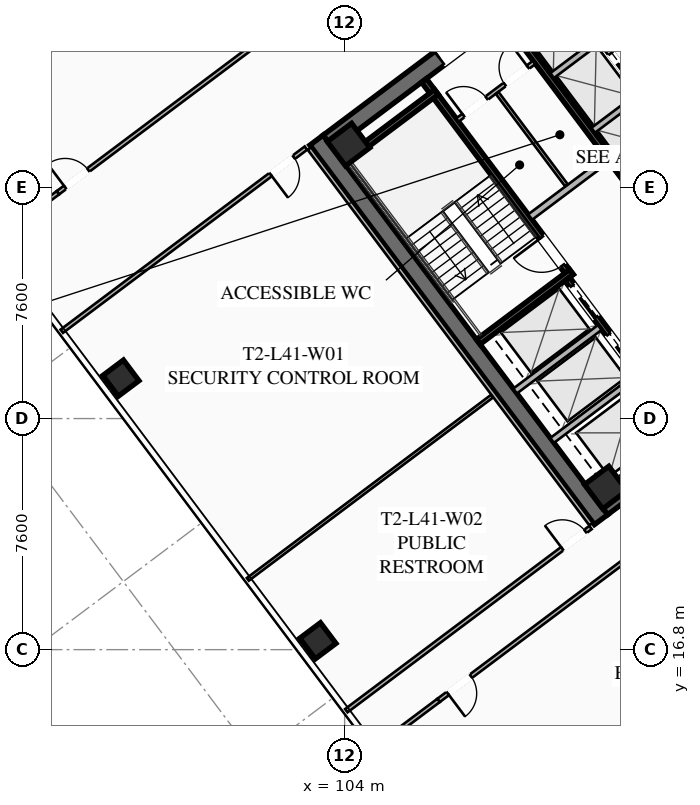
"""IFC4 building model, lengths in metres.
Left out: names, types, materials, properties, quantities, classifications, styles, units other than length and angle.
Written with IfcOpenShell. Run it as: python <this file> out.ifc"""

import sys

from ifc_helpers import new_model, si_unit, direction, frame, frame_2d, origin, origin_2d, place, context, subcontext, project, spatial, rectangle, hollow_rectangle, extrude, element, fill, save


model = new_model("IFC4")
c1 = context("Model", 3, precision=1e-05, world=origin(), true_north=direction((0.0, 1.0)))
c2 = subcontext(c1, "Body", "Model", "MODEL_VIEW")
j1 = project(units=[si_unit("LENGTHUNIT", "METRE"), si_unit("PLANEANGLEUNIT", "RADIAN")], contexts=[c1])
p1 = place(None, origin())
s1 = spatial("IfcSite", under=j1, at=p1, CompositionType="ELEMENT")
p2 = place(p1, origin())
s2 = spatial("IfcBuilding", under=s1, at=p2, CompositionType="ELEMENT")
p3 = place(p2, frame((0.0, 0.0, 153.45)))
s3 = spatial("IfcBuildingStorey", under=s2, at=p3, CompositionType="ELEMENT", Elevation=153.45)
p4 = place(p3, frame((112.436, 21.077, 0.0), z_axis=(0.0, 0.0, 1.0), x_axis=(-0.600005007985, 0.799996243986, 0.0)))
e1 = element("IfcWall", 1, at=p4, inside=s3, PredefinedType="SHEAR", context=c2, shape_type="SweptSolid", body=[
    extrude(rectangle(XDim=15.6, YDim=0.55, at=frame_2d((7.8, 0.0))), origin(), (0.0, 0.0, 1.0), 3.55),
])
p5 = place(p3, frame((124.539, 30.498, 0.0), z_axis=(0.0, 0.0, 1.0), x_axis=(-0.799998054672, -0.600002593761, 0.0)))
e2 = element("IfcWall", 2, at=p5, inside=s3, PredefinedType="SHEAR", context=c2, shape_type="SweptSolid", body=[
    extrude(rectangle(XDim=15.06, YDim=0.55, at=frame_2d((7.53, 0.0))), origin(), (0.0, 0.0, 1.0), 3.55),
])
p6 = place(p5, frame((9.23, 0.0, 0.0)))
e3 = element("IfcOpeningElement", 3, at=p6, cuts=e2, PredefinedType="OPENING", context=c2, shape_type="SweptSolid", body=[
    extrude(rectangle(XDim=1.25, YDim=2.25, at=frame_2d((0.625, 1.125))), frame((0.0, 0.285, 0.0), z_axis=(0.0, -1.0, 0.0), x_axis=(1.0, 0.0, 0.0)), (0.0, 0.0, 1.0), 0.57),
])
p7 = place(p5, frame((4.18, 0.0, 0.0)))
e4 = element("IfcOpeningElement", 4, at=p7, cuts=e2, PredefinedType="OPENING", context=c2, shape_type="SweptSolid", body=[
    extrude(rectangle(XDim=1.25, YDim=2.25, at=frame_2d((0.625, 1.125))), frame((0.0, 0.285, 0.0), z_axis=(0.0, -1.0, 0.0), x_axis=(1.0, 0.0, 0.0)), (0.0, 0.0, 1.0), 0.57),
])
p8 = place(p3, frame((103.461, 33.502, 0.0), z_axis=(0.0, 0.0, 1.0), x_axis=(0.799998054672, 0.600002593761, 0.0)))
e5 = element("IfcWall", 5, at=p8, inside=s3, PredefinedType="SHEAR", context=c2, shape_type="SweptSolid", body=[
    extrude(rectangle(XDim=15.06, YDim=0.55, at=frame_2d((7.53, 0.0))), origin(), (0.0, 0.0, 1.0), 3.55),
])
p9 = place(p8, frame((4.58, 0.0, 0.0)))
e6 = element("IfcOpeningElement", 6, at=p9, cuts=e5, PredefinedType="OPENING", context=c2, shape_type="SweptSolid", body=[
    extrude(rectangle(XDim=1.25, YDim=2.25, at=frame_2d((0.625, 1.125))), frame((0.0, 0.285, 0.0), z_axis=(0.0, -1.0, 0.0), x_axis=(1.0, 0.0, 0.0)), (0.0, 0.0, 1.0), 0.57),
])
p10 = place(p8, frame((9.63, 0.0, 0.0)))
e7 = element("IfcOpeningElement", 7, at=p10, cuts=e5, PredefinedType="OPENING", context=c2, shape_type="SweptSolid", body=[
    extrude(rectangle(XDim=1.25, YDim=2.25, at=frame_2d((0.625, 1.125))), frame((0.0, 0.285, 0.0), z_axis=(0.0, -1.0, 0.0), x_axis=(1.0, 0.0, 0.0)), (0.0, 0.0, 1.0), 0.57),
])
for number, where, z_axis, x_axis in (
    (8, (112.59, 22.13, 0.0), (0.0, 0.0, 1.0), (0.8, 0.6, 0.0)),
    (9, (104.13, 33.41, 0.0), (0.0, 0.0, 1.0), (0.8, 0.6, 0.0)),
):
    element("IfcColumn", number, at=place(p3, frame(where, z_axis=z_axis, x_axis=x_axis)), inside=s3, PredefinedType="COLUMN", context=c2, shape_type="SweptSolid", body=[
        extrude(hollow_rectangle(XDim=1.0, YDim=1.0, WallThickness=0.04, at=origin_2d()), origin(), (0.0, 0.0, 1.0), 3.37),
    ])
for number, where, z_axis, x_axis in (
    (10, (96.64, 25.73, 0.0), (0.0, 0.0, 1.0), (0.8, 0.6, 0.0)),
    (11, (103.12, 17.09, 0.0), (0.0, 0.0, 1.0), (0.8, 0.6, 0.0)),
):
    element("IfcColumn", number, at=place(p3, frame(where, z_axis=z_axis, x_axis=x_axis)), inside=s3, PredefinedType="COLUMN", context=c2, shape_type="SweptSolid", body=[
        extrude(hollow_rectangle(XDim=0.85, YDim=0.85, WallThickness=0.035, at=origin_2d()), origin(), (0.0, 0.0, 1.0), 3.37),
    ])
p11 = place(p3, frame((111.44, 29.08, 0.0), z_axis=(0.0, 0.0, 1.0), x_axis=(-0.59999029481, 0.8000072788, 0.0)))
e12 = element("IfcWall", 12, at=p11, inside=s3, PredefinedType="SHEAR", context=c2, shape_type="SweptSolid", body=[
    extrude(rectangle(XDim=8.05, YDim=0.2, at=frame_2d((4.025, 0.0))), origin(), (0.0, 0.0, 1.0), 3.37),
])
p12 = place(p11, frame((0.45, 0.0, 0.0)))
e13 = element("IfcOpeningElement", 13, at=p12, cuts=e12, PredefinedType="OPENING", context=c2, shape_type="SweptSolid", body=[
    extrude(rectangle(XDim=1.15, YDim=2.2, at=frame_2d((0.575, 1.1))), frame((0.0, 0.11, 0.0), z_axis=(0.0, -1.0, 0.0), x_axis=(1.0, 0.0, 0.0)), (0.0, 0.0, 1.0), 0.22),
])
for number, where, z_axis, x_axis in (
    (14, (108.396, 26.922, 0.0), (0.0, 0.0, 1.0), (0.8, 0.6, 0.0)),
    (15, (103.956, 32.842, 0.0), (0.0, 0.0, 1.0), (0.8, 0.6, 0.0)),
):
    element("IfcWall", number, at=place(p3, frame(where, z_axis=z_axis, x_axis=x_axis)), inside=s3, PredefinedType="SHEAR", context=c2, shape_type="SweptSolid", body=[
        extrude(rectangle(XDim=3.83, YDim=0.2, at=frame_2d((1.915, 0.0))), origin(), (0.0, 0.0, 1.0), 3.37),
    ])
p13 = place(p3, frame((117.998, 25.936, 0.0), z_axis=(0.0, 0.0, 1.0), x_axis=(-0.600002693989, 0.799997979501, 0.0)))
e16 = element("IfcWall", 16, at=p13, inside=s3, PredefinedType="SHEAR", context=c2, shape_type="SweptSolid", body=[
    extrude(rectangle(XDim=14.5, YDim=0.2, at=frame_2d((7.25, 0.0))), origin(), (0.0, 0.0, 1.0), 3.37),
])
p14 = place(p3, frame((110.104, 31.028, 0.0), z_axis=(0.0, 0.0, 1.0), x_axis=(0.800018601094, 0.59997519774, 0.0)))
e17 = element("IfcWall", 17, at=p14, inside=s3, PredefinedType="SOLIDWALL", context=c2, shape_type="SweptSolid", body=[
    extrude(rectangle(XDim=3.15, YDim=0.22, at=frame_2d((1.575, 0.0))), origin(), (0.0, 0.0, 1.0), 2.513),
])
p15 = place(p3, frame((115.19, 23.83, 0.0), z_axis=(0.0, 0.0, 1.0), x_axis=(-0.599993943644, 0.800004542231, 0.0)))
e18 = element("IfcWall", 18, at=p15, inside=s3, PredefinedType="SHEAR", context=c2, shape_type="SweptSolid", body=[
    extrude(rectangle(XDim=6.45, YDim=0.2, at=frame_2d((3.225, 0.0))), origin(), (0.0, 0.0, 1.0), 3.37),
])
p16 = place(p15, frame((4.875, 0.0, 0.0)))
e19 = element("IfcOpeningElement", 19, at=p16, cuts=e18, PredefinedType="OPENING", context=c2, shape_type="SweptSolid", body=[
    extrude(rectangle(XDim=1.3, YDim=2.25, at=frame_2d((0.65, 1.125))), frame((0.0, 0.11, 0.0), z_axis=(0.0, -1.0, 0.0), x_axis=(1.0, 0.0, 0.0)), (0.0, 0.0, 1.0), 0.22),
])
p17 = place(p15, frame((2.875, 0.0, 0.0)))
e20 = element("IfcOpeningElement", 20, at=p17, cuts=e18, PredefinedType="OPENING", context=c2, shape_type="SweptSolid", body=[
    extrude(rectangle(XDim=1.3, YDim=2.25, at=frame_2d((0.65, 1.125))), frame((0.0, 0.11, 0.0), z_axis=(0.0, -1.0, 0.0), x_axis=(1.0, 0.0, 0.0)), (0.0, 0.0, 1.0), 0.22),
])
p18 = place(p15, frame((0.675, 0.0, 0.0)))
e21 = element("IfcOpeningElement", 21, at=p18, cuts=e18, PredefinedType="OPENING", context=c2, shape_type="SweptSolid", body=[
    extrude(rectangle(XDim=1.3, YDim=2.25, at=frame_2d((0.65, 1.125))), frame((0.0, 0.11, 0.0), z_axis=(0.0, -1.0, 0.0), x_axis=(1.0, 0.0, 0.0)), (0.0, 0.0, 1.0), 0.22),
])
for number, where, z_axis, x_axis in (
    (22, (110.826, 23.682, 0.0), (0.0, 0.0, 1.0), (0.8, 0.6, 0.0)),
    (23, (109.608, 25.306, 0.0), (0.0, 0.0, 1.0), (0.8, 0.6, 0.0)),
):
    element("IfcWall", number, at=place(p3, frame(where, z_axis=z_axis, x_axis=x_axis)), inside=s3, PredefinedType="SOLIDWALL", context=c2, shape_type="SweptSolid", body=[
        extrude(rectangle(XDim=3.48, YDim=0.2, at=frame_2d((1.74, 0.0))), origin(), (0.0, 0.0, 1.0), 3.37),
    ])
p19 = place(p3, frame((112.81, 40.17, 0.0), z_axis=(0.0, 0.0, 1.0), x_axis=(0.599993943644, -0.800004542231, 0.0)))
e24 = element("IfcWall", 24, at=p19, inside=s3, PredefinedType="SHEAR", context=c2, shape_type="SweptSolid", body=[
    extrude(rectangle(XDim=6.45, YDim=0.2, at=frame_2d((3.225, 0.0))), origin(), (0.0, 0.0, 1.0), 3.37),
])
p20 = place(p3, frame((107.71, 34.22, 0.0), z_axis=(0.0, 0.0, 1.0), x_axis=(0.799981399002, 0.60002480053, 0.0)))
e25 = element("IfcWall", 25, at=p20, inside=s3, PredefinedType="PARTITIONING", context=c2, shape_type="SweptSolid", body=[
    extrude(rectangle(XDim=3.15, YDim=0.135, at=frame_2d((1.575, 0.0))), origin(), (0.0, 0.0, 1.0), 2.513),
])
p21 = place(p20, frame((0.25, 0.0, 0.0)))
e26 = element("IfcOpeningElement", 26, at=p21, cuts=e25, PredefinedType="OPENING", context=c2, shape_type="SweptSolid", body=[
    extrude(rectangle(XDim=0.95, YDim=2.05, at=frame_2d((0.475, 1.025))), frame((0.0, 0.077, 0.0), z_axis=(0.0, -1.0, 0.0), x_axis=(1.0, 0.0, 0.0)), (0.0, 0.0, 1.0), 0.155),
])
p22 = place(p20, frame((1.95, 0.0, 0.0)))
e27 = element("IfcOpeningElement", 27, at=p22, cuts=e25, PredefinedType="OPENING", context=c2, shape_type="SweptSolid", body=[
    extrude(rectangle(XDim=0.95, YDim=2.05, at=frame_2d((0.475, 1.025))), frame((0.0, 0.077, 0.0), z_axis=(0.0, -1.0, 0.0), x_axis=(1.0, 0.0, 0.0)), (0.0, 0.0, 1.0), 0.155),
])
p23 = place(p3, frame((111.296, 32.072, 0.0), z_axis=(0.0, 0.0, 1.0), x_axis=(-0.59995887973, 0.800030838552, 0.0)))
e28 = element("IfcWall", 28, at=p23, inside=s3, PredefinedType="PARTITIONING", context=c2, shape_type="SweptSolid", body=[
    extrude(rectangle(XDim=3.8, YDim=0.11, at=frame_2d((1.9, 0.0))), origin(), (0.0, 0.0, 1.0), 2.513),
])
p24 = place(p3, frame((115.11, 33.27, 0.0), z_axis=(0.0, 0.0, 1.0), x_axis=(-0.600011322243, 0.799991508192, 0.0)))
e29 = element("IfcWall", 29, at=p24, inside=s3, PredefinedType="SOLIDWALL", context=c2, shape_type="SweptSolid", body=[
    extrude(rectangle(XDim=6.9, YDim=0.2, at=frame_2d((3.45, 0.0))), origin(), (0.0, 0.0, 1.0), 3.37),
])
p25 = place(p24, frame((0.575, 0.0, 0.0)))
e30 = element("IfcOpeningElement", 30, at=p25, cuts=e29, PredefinedType="OPENING", context=c2, shape_type="SweptSolid", body=[
    extrude(rectangle(XDim=1.1, YDim=2.2, at=frame_2d((0.55, 1.1))), frame((0.0, 0.11, 0.0), z_axis=(0.0, -1.0, 0.0), x_axis=(1.0, 0.0, 0.0)), (0.0, 0.0, 1.0), 0.22),
])
p26 = place(p24, frame((2.825, 0.0, 0.0)))
e31 = element("IfcOpeningElement", 31, at=p26, cuts=e29, PredefinedType="OPENING", context=c2, shape_type="SweptSolid", body=[
    extrude(rectangle(XDim=1.1, YDim=2.2, at=frame_2d((0.55, 1.1))), frame((0.0, 0.11, 0.0), z_axis=(0.0, -1.0, 0.0), x_axis=(1.0, 0.0, 0.0)), (0.0, 0.0, 1.0), 0.22),
])
p27 = place(p24, frame((5.075, 0.0, 0.0)))
e32 = element("IfcOpeningElement", 32, at=p27, cuts=e29, PredefinedType="OPENING", context=c2, shape_type="SweptSolid", body=[
    extrude(rectangle(XDim=1.1, YDim=2.2, at=frame_2d((0.55, 1.1))), frame((0.0, 0.11, 0.0), z_axis=(0.0, -1.0, 0.0), x_axis=(1.0, 0.0, 0.0)), (0.0, 0.0, 1.0), 0.22),
])
p28 = place(p3, frame((112.176, 33.882, 0.0), z_axis=(0.0, 0.0, 1.0), x_axis=(0.8, 0.6, 0.0)))
e33 = element("IfcWall", 33, at=p28, inside=s3, PredefinedType="SOLIDWALL", context=c2, shape_type="SweptSolid", body=[
    extrude(rectangle(XDim=1.88, YDim=0.2, at=frame_2d((0.94, 0.0))), origin(), (0.0, 0.0, 1.0), 3.37),
])
p29 = place(p3, frame((110.826, 35.682, 0.0), z_axis=(0.0, 0.0, 1.0), x_axis=(0.799984418148, 0.600020775241, 0.0)))
e34 = element("IfcWall", 34, at=p29, inside=s3, PredefinedType="SOLIDWALL", context=c2, shape_type="SweptSolid", body=[
    extrude(rectangle(XDim=1.88, YDim=0.2, at=frame_2d((0.94, 0.0))), origin(), (0.0, 0.0, 1.0), 3.37),
])
p30 = place(p3, frame((94.568, 31.826, 0.0), z_axis=(0.0, 0.0, 1.0), x_axis=(0.799997191971, 0.600003744021, 0.0)))
e35 = element("IfcWall", 35, at=p30, inside=s3, PredefinedType="PARTITIONING", context=c2, shape_type="SweptSolid", body=[
    extrude(rectangle(XDim=31.3, YDim=0.135, at=frame_2d((15.65, 0.0))), origin(), (0.0, 0.0, 1.0), 2.513),
])
p31 = place(p30, frame((0.3, 0.0, 0.0)))
e36 = element("IfcOpeningElement", 36, at=p31, cuts=e35, PredefinedType="OPENING", context=c2, shape_type="SweptSolid", body=[
    extrude(rectangle(XDim=0.95, YDim=2.05, at=frame_2d((0.475, 1.025))), frame((0.0, 0.077, 0.0), z_axis=(0.0, -1.0, 0.0), x_axis=(1.0, 0.0, 0.0)), (0.0, 0.0, 1.0), 0.155),
])
p32 = place(p3, frame((92.464, 30.248, 0.0), z_axis=(0.0, 0.0, 1.0), x_axis=(0.80002227902, 0.599970293491, 0.0)))
e37 = element("IfcWall", 37, at=p32, inside=s3, PredefinedType="PARTITIONING", context=c2, shape_type="SweptSolid", body=[
    extrude(rectangle(XDim=2.63, YDim=0.135, at=frame_2d((1.315, 0.0))), origin(), (0.0, 0.0, 1.0), 2.513),
])
p33 = place(p3, frame((132.13, 33.91, 0.0), z_axis=(0.0, 0.0, 1.0), x_axis=(-0.799997191971, -0.600003744021, 0.0)))
e38 = element("IfcWall", 38, at=p33, inside=s3, PredefinedType="PARTITIONING", context=c2, shape_type="SweptSolid", body=[
    extrude(rectangle(XDim=31.3, YDim=0.135, at=frame_2d((15.65, 0.0))), origin(), (0.0, 0.0, 1.0), 2.513),
])
p34 = place(p33, frame((29.97, 0.0, 0.0)))
e39 = element("IfcOpeningElement", 39, at=p34, cuts=e38, PredefinedType="OPENING", context=c2, shape_type="SweptSolid", body=[
    extrude(rectangle(XDim=0.95, YDim=2.05, at=frame_2d((0.475, 1.025))), frame((0.0, 0.077, 0.0), z_axis=(0.0, -1.0, 0.0), x_axis=(1.0, 0.0, 0.0)), (0.0, 0.0, 1.0), 0.155),
])
p35 = place(p33, frame((0.38, 0.0, 0.0)))
e40 = element("IfcOpeningElement", 40, at=p35, cuts=e38, PredefinedType="OPENING", context=c2, shape_type="SweptSolid", body=[
    extrude(rectangle(XDim=0.95, YDim=2.05, at=frame_2d((0.475, 1.025))), frame((0.0, 0.077, 0.0), z_axis=(0.0, -1.0, 0.0), x_axis=(1.0, 0.0, 0.0)), (0.0, 0.0, 1.0), 0.155),
])
p36 = place(p3, frame((104.986, 13.552, 0.0), z_axis=(0.0, 0.0, 1.0), x_axis=(0.80002227902, 0.599970293491, 0.0)))
e41 = element("IfcWall", 41, at=p36, inside=s3, PredefinedType="PARTITIONING", context=c2, shape_type="SweptSolid", body=[
    extrude(rectangle(XDim=2.63, YDim=0.135, at=frame_2d((1.315, 0.0))), origin(), (0.0, 0.0, 1.0), 2.513),
])
p37 = place(p3, frame((112.104, 20.928, 0.0), z_axis=(0.0, 0.0, 1.0), x_axis=(-0.599994940075, 0.800003794918, 0.0)))
e42 = element("IfcWall", 42, at=p37, inside=s3, PredefinedType="PARTITIONING", context=c2, shape_type="SweptSolid", body=[
    extrude(rectangle(XDim=15.44, YDim=0.135, at=frame_2d((7.72, 0.0))), origin(), (0.0, 0.0, 1.0), 2.513),
])
p38 = place(p3, frame((102.728, 33.296, 0.0), z_axis=(0.0, 0.0, 1.0), x_axis=(-0.800002918023, -0.599996109283, 0.0)))
e43 = element("IfcWall", 43, at=p38, inside=s3, PredefinedType="PARTITIONING", context=c2, shape_type="SweptSolid", body=[
    extrude(rectangle(XDim=10.04, YDim=0.135, at=frame_2d((5.02, 0.0))), origin(), (0.0, 0.0, 1.0), 2.513),
])
p39 = place(p38, frame((0.5, 0.0, 0.0)))
e44 = element("IfcOpeningElement", 44, at=p39, cuts=e43, PredefinedType="OPENING", context=c2, shape_type="SweptSolid", body=[
    extrude(rectangle(XDim=0.95, YDim=2.05, at=frame_2d((0.475, 1.025))), frame((0.0, 0.077, 0.0), z_axis=(0.0, -1.0, 0.0), x_axis=(1.0, 0.0, 0.0)), (0.0, 0.0, 1.0), 0.155),
])
p40 = place(p3, frame((104.056, 14.792, 0.0), z_axis=(0.0, 0.0, 1.0), x_axis=(0.800002918023, 0.599996109283, 0.0)))
e45 = element("IfcWall", 45, at=p40, inside=s3, PredefinedType="PARTITIONING", context=c2, shape_type="SweptSolid", body=[
    extrude(rectangle(XDim=10.04, YDim=0.135, at=frame_2d((5.02, 0.0))), origin(), (0.0, 0.0, 1.0), 2.513),
])
p41 = place(p40, frame((8.88, 0.0, 0.0)))
e46 = element("IfcOpeningElement", 46, at=p41, cuts=e45, PredefinedType="OPENING", context=c2, shape_type="SweptSolid", body=[
    extrude(rectangle(XDim=0.95, YDim=2.05, at=frame_2d((0.475, 1.025))), frame((0.0, 0.077, 0.0), z_axis=(0.0, -1.0, 0.0), x_axis=(1.0, 0.0, 0.0)), (0.0, 0.0, 1.0), 0.155),
])
p42 = place(p3, frame((100.816, 19.112, 0.0), z_axis=(0.0, 0.0, 1.0), x_axis=(0.800002918023, 0.599996109283, 0.0)))
e47 = element("IfcWall", 47, at=p42, inside=s3, PredefinedType="PARTITIONING", context=c2, shape_type="SweptSolid", body=[
    extrude(rectangle(XDim=10.04, YDim=0.11, at=frame_2d((5.02, 0.0))), origin(), (0.0, 0.0, 1.0), 2.513),
])
p43 = place(p9, origin())
e48 = element("IfcDoor", 48, at=p43, inside=s3, OperationType="SINGLE_SWING_LEFT", PredefinedType="DOOR", context=c2, shape_type="SweptSolid", body=[
    extrude(rectangle(XDim=1.25, YDim=2.25, at=frame_2d((0.625, 1.125))), frame((0.0, 0.025, 0.0), z_axis=(0.0, -1.0, 0.0), x_axis=(1.0, 0.0, 0.0)), (0.0, 0.0, 1.0), 0.05),
])
fill(e6, e48)
p44 = place(p12, origin())
e49 = element("IfcDoor", 49, at=p44, inside=s3, OperationType="SINGLE_SWING_RIGHT", PredefinedType="DOOR", context=c2, shape_type="SweptSolid", body=[
    extrude(rectangle(XDim=1.15, YDim=2.2, at=frame_2d((0.575, 1.1))), frame((0.0, 0.025, 0.0), z_axis=(0.0, -1.0, 0.0), x_axis=(1.0, 0.0, 0.0)), (0.0, 0.0, 1.0), 0.05),
])
fill(e13, e49)
p45 = place(p21, origin())
e50 = element("IfcDoor", 50, at=p45, inside=s3, OperationType="SINGLE_SWING_LEFT", PredefinedType="DOOR", context=c2, shape_type="SweptSolid", body=[
    extrude(rectangle(XDim=0.95, YDim=2.05, at=frame_2d((0.475, 1.025))), frame((0.0, 0.025, 0.0), z_axis=(0.0, -1.0, 0.0), x_axis=(1.0, 0.0, 0.0)), (0.0, 0.0, 1.0), 0.05),
])
fill(e26, e50)
p46 = place(p22, origin())
e51 = element("IfcDoor", 51, at=p46, inside=s3, OperationType="SINGLE_SWING_RIGHT", PredefinedType="DOOR", context=c2, shape_type="SweptSolid", body=[
    extrude(rectangle(XDim=0.95, YDim=2.05, at=frame_2d((0.475, 1.025))), frame((0.0, 0.025, 0.0), z_axis=(0.0, -1.0, 0.0), x_axis=(1.0, 0.0, 0.0)), (0.0, 0.0, 1.0), 0.05),
])
fill(e27, e51)
p47 = place(p31, origin())
e52 = element("IfcDoor", 52, at=p47, inside=s3, OperationType="SINGLE_SWING_LEFT", PredefinedType="DOOR", context=c2, shape_type="SweptSolid", body=[
    extrude(rectangle(XDim=0.95, YDim=2.05, at=frame_2d((0.475, 1.025))), frame((0.0, 0.025, 0.0), z_axis=(0.0, -1.0, 0.0), x_axis=(1.0, 0.0, 0.0)), (0.0, 0.0, 1.0), 0.05),
])
fill(e36, e52)
p48 = place(p34, origin())
e53 = element("IfcDoor", 53, at=p48, inside=s3, OperationType="SINGLE_SWING_RIGHT", PredefinedType="DOOR", context=c2, shape_type="SweptSolid", body=[
    extrude(rectangle(XDim=0.95, YDim=2.05, at=frame_2d((0.475, 1.025))), frame((0.0, 0.025, 0.0), z_axis=(0.0, -1.0, 0.0), x_axis=(1.0, 0.0, 0.0)), (0.0, 0.0, 1.0), 0.05),
])
fill(e39, e53)
p49 = place(p39, origin())
e54 = element("IfcDoor", 54, at=p49, inside=s3, OperationType="SINGLE_SWING_RIGHT", PredefinedType="DOOR", context=c2, shape_type="SweptSolid", body=[
    extrude(rectangle(XDim=0.95, YDim=2.05, at=frame_2d((0.475, 1.025))), frame((0.0, 0.025, 0.0), z_axis=(0.0, -1.0, 0.0), x_axis=(1.0, 0.0, 0.0)), (0.0, 0.0, 1.0), 0.05),
])
fill(e44, e54)
p50 = place(p41, origin())
e55 = element("IfcDoor", 55, at=p50, inside=s3, OperationType="SINGLE_SWING_LEFT", PredefinedType="DOOR", context=c2, shape_type="SweptSolid", body=[
    extrude(rectangle(XDim=0.95, YDim=2.05, at=frame_2d((0.475, 1.025))), frame((0.0, 0.025, 0.0), z_axis=(0.0, -1.0, 0.0), x_axis=(1.0, 0.0, 0.0)), (0.0, 0.0, 1.0), 0.05),
])
fill(e46, e55)
p51 = place(p16, origin())
e56 = element("IfcDoor", 56, at=p51, inside=s3, OperationType="SLIDING_TO_LEFT", PredefinedType="DOOR", context=c2, shape_type="SweptSolid", body=[
    extrude(rectangle(XDim=1.3, YDim=2.25, at=frame_2d((0.65, 1.125))), frame((0.0, 0.025, 0.0), z_axis=(0.0, -1.0, 0.0), x_axis=(1.0, 0.0, 0.0)), (0.0, 0.0, 1.0), 0.05),
])
fill(e19, e56)
p52 = place(p17, origin())
e57 = element("IfcDoor", 57, at=p52, inside=s3, OperationType="SLIDING_TO_LEFT", PredefinedType="DOOR", context=c2, shape_type="SweptSolid", body=[
    extrude(rectangle(XDim=1.3, YDim=2.25, at=frame_2d((0.65, 1.125))), frame((0.0, 0.025, 0.0), z_axis=(0.0, -1.0, 0.0), x_axis=(1.0, 0.0, 0.0)), (0.0, 0.0, 1.0), 0.05),
])
fill(e20, e57)
p53 = place(p26, origin())
e58 = element("IfcDoor", 58, at=p53, inside=s3, OperationType="SLIDING_TO_LEFT", PredefinedType="DOOR", context=c2, shape_type="SweptSolid", body=[
    extrude(rectangle(XDim=1.1, YDim=2.2, at=frame_2d((0.55, 1.1))), frame((0.0, 0.025, 0.0), z_axis=(0.0, -1.0, 0.0), x_axis=(1.0, 0.0, 0.0)), (0.0, 0.0, 1.0), 0.05),
])
fill(e31, e58)
save(model, sys.argv[1])
